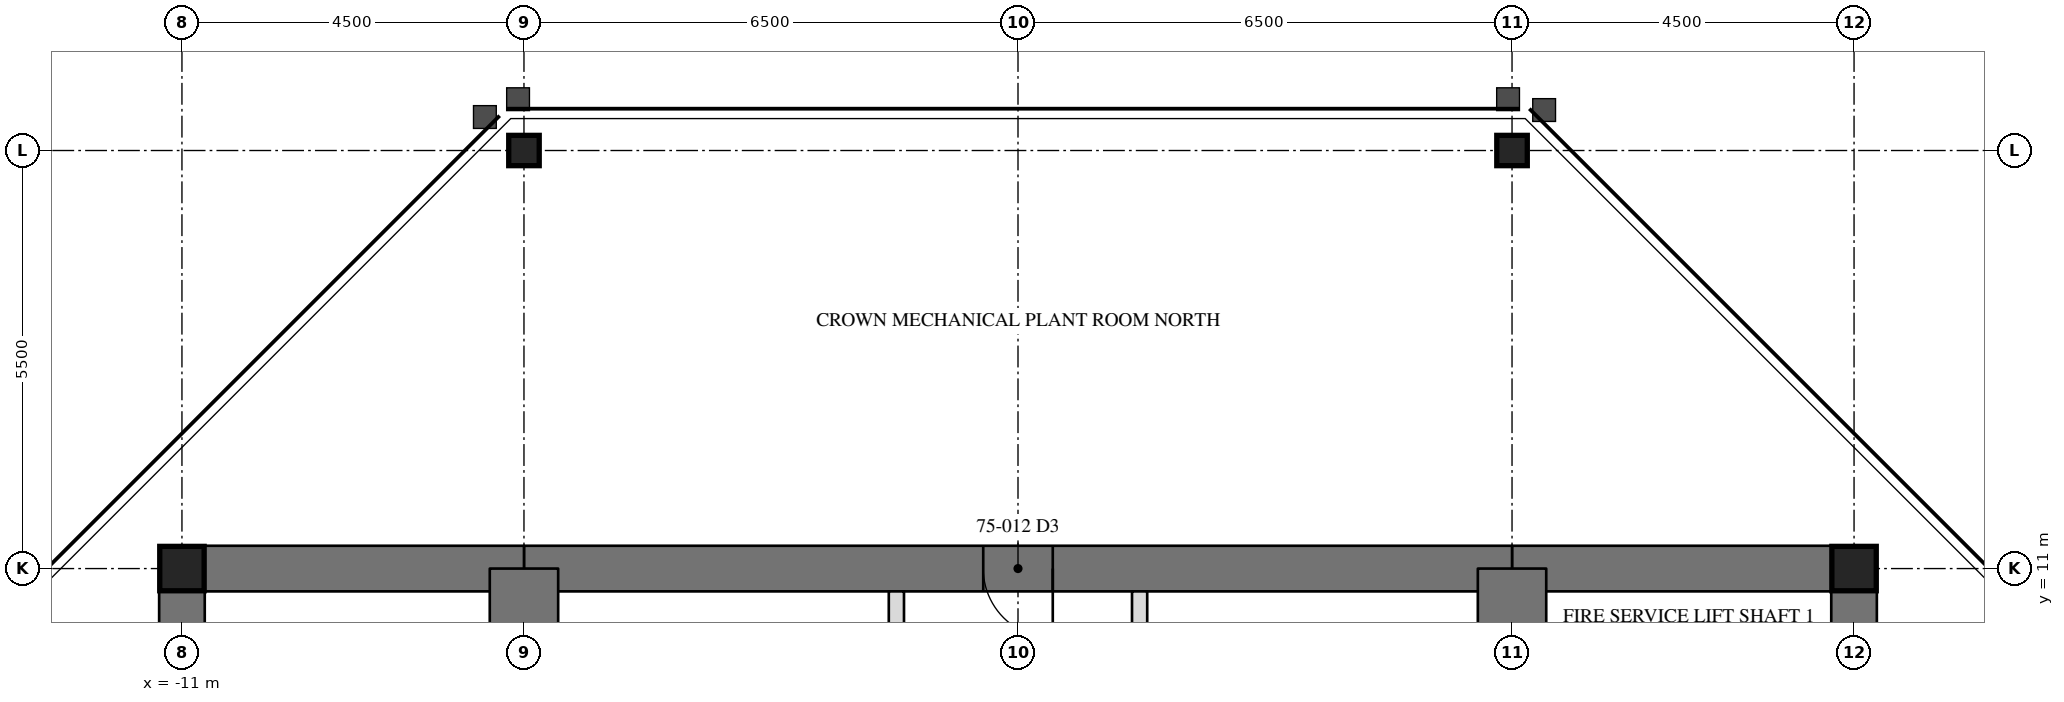
"""IFC4 building model, lengths in metres.
Left out: names, types, materials, properties, quantities, classifications, styles, units other than length and angle.
Written with IfcOpenShell. Run it as: python <this file> out.ifc"""

import sys

from ifc_helpers import new_model, si_unit, direction, frame, frame_2d, origin, origin_2d, place, context, subcontext, project, spatial, rectangle, hollow_rectangle, i_section, extrude, element, fill, save


model = new_model("IFC4")
c1 = context("Model", 3, precision=1e-05, world=origin(), true_north=direction((0.0, 1.0)))
c2 = subcontext(c1, "Body", "Model", "MODEL_VIEW")
j1 = project(units=[si_unit("LENGTHUNIT", "METRE"), si_unit("PLANEANGLEUNIT", "RADIAN")], contexts=[c1])
p1 = place(None, origin())
s1 = spatial("IfcSite", under=j1, at=p1, CompositionType="ELEMENT")
p2 = place(p1, origin())
s2 = spatial("IfcBuilding", under=s1, at=p2, CompositionType="ELEMENT")
p3 = place(p2, frame((0.0, 0.0, 304.2)))
s3 = spatial("IfcBuildingStorey", under=s2, at=p3, CompositionType="ELEMENT", Elevation=304.2)
for number, where, z_axis, x_axis in (
    (1, (6.5, 16.5, 0.0), (0.0, 0.0, 1.0), (1.0, 0.0, 0.0)),
    (2, (-6.5, 16.5, 0.0), (0.0, 0.0, 1.0), (1.0, 0.0, 0.0)),
):
    element("IfcColumn", number, at=place(p3, frame(where, z_axis=z_axis, x_axis=x_axis)), inside=s3, PredefinedType="COLUMN", context=c2, shape_type="SweptSolid", body=[
        extrude(i_section(OverallWidth=0.401, OverallDepth=0.399, WebThickness=0.025, FlangeThickness=0.04, at=origin_2d()), origin(), (0.0, 0.0, 1.0), 6.0),
    ])
p4 = place(p3, frame((11.0, -11.0, 0.0), z_axis=(0.0, 0.0, 1.0), x_axis=(0.0, 1.0, 0.0)))
e3 = element("IfcWall", 3, at=p4, inside=s3, PredefinedType="SHEAR", context=c2, shape_type="SweptSolid", body=[
    extrude(rectangle(XDim=22.0, YDim=0.6, at=frame_2d((11.0, 0.0))), origin(), (0.0, 0.0, 1.0), 6.0),
])
p5 = place(p4, frame((15.393, 0.0, 0.0)))
e4 = element("IfcOpeningElement", 4, at=p5, cuts=e3, PredefinedType="OPENING", context=c2, shape_type="SweptSolid", body=[
    extrude(rectangle(XDim=0.915, YDim=2.134, at=frame_2d((0.458, 1.067))), frame((0.0, 0.31, 0.0), z_axis=(0.0, -1.0, 0.0), x_axis=(1.0, 0.0, 0.0)), (0.0, 0.0, 1.0), 0.62),
])
p6 = place(p3, frame((-11.0, 11.0, 0.0), z_axis=(0.0, 0.0, 1.0), x_axis=(0.0, -1.0, 0.0)))
e5 = element("IfcWall", 5, at=p6, inside=s3, PredefinedType="SHEAR", context=c2, shape_type="SweptSolid", body=[
    extrude(rectangle(XDim=22.0, YDim=0.6, at=frame_2d((11.0, 0.0))), origin(), (0.0, 0.0, 1.0), 6.0),
])
p7 = place(p6, frame((15.393, 0.0, 0.0)))
e6 = element("IfcOpeningElement", 6, at=p7, cuts=e5, PredefinedType="OPENING", context=c2, shape_type="SweptSolid", body=[
    extrude(rectangle(XDim=0.915, YDim=2.134, at=frame_2d((0.458, 1.067))), frame((0.0, 0.31, 0.0), z_axis=(0.0, -1.0, 0.0), x_axis=(1.0, 0.0, 0.0)), (0.0, 0.0, 1.0), 0.62),
])
p8 = place(p3, frame((11.0, 11.0, 0.0), z_axis=(0.0, 0.0, 1.0), x_axis=(-1.0, 0.0, 0.0)))
e7 = element("IfcWall", 7, at=p8, inside=s3, PredefinedType="SHEAR", context=c2, shape_type="SweptSolid", body=[
    extrude(rectangle(XDim=4.5, YDim=0.6, at=frame_2d((2.25, 0.0))), origin(), (0.0, 0.0, 1.0), 6.0),
])
p9 = place(p3, frame((6.5, 11.0, 0.0), z_axis=(0.0, 0.0, 1.0), x_axis=(-1.0, 0.0, 0.0)))
e8 = element("IfcWall", 8, at=p9, inside=s3, PredefinedType="SHEAR", context=c2, shape_type="SweptSolid", body=[
    extrude(rectangle(XDim=13.0, YDim=0.6, at=frame_2d((6.5, 0.0))), origin(), (0.0, 0.0, 1.0), 6.0),
])
p10 = place(p9, frame((6.042, 0.0, 0.0)))
e9 = element("IfcOpeningElement", 9, at=p10, cuts=e8, PredefinedType="OPENING", context=c2, shape_type="SweptSolid", body=[
    extrude(rectangle(XDim=0.915, YDim=2.134, at=frame_2d((0.458, 1.067))), frame((0.0, 0.31, 0.0), z_axis=(0.0, -1.0, 0.0), x_axis=(1.0, 0.0, 0.0)), (0.0, 0.0, 1.0), 0.62),
])
p11 = place(p3, frame((-6.5, 11.0, 0.0), z_axis=(0.0, 0.0, 1.0), x_axis=(-1.0, 0.0, 0.0)))
e10 = element("IfcWall", 10, at=p11, inside=s3, PredefinedType="SHEAR", context=c2, shape_type="SweptSolid", body=[
    extrude(rectangle(XDim=4.5, YDim=0.6, at=frame_2d((2.25, 0.0))), origin(), (0.0, 0.0, 1.0), 6.0),
])
for number, where, z_axis, x_axis in (
    (11, (6.5, 6.5, 0.0), (0.0, 0.0, 1.0), (0.0, 1.0, 0.0)),
    (12, (-6.5, 11.0, 0.0), (0.0, 0.0, 1.0), (0.0, -1.0, 0.0)),
):
    element("IfcWall", number, at=place(p3, frame(where, z_axis=z_axis, x_axis=x_axis)), inside=s3, PredefinedType="SHEAR", context=c2, shape_type="SweptSolid", body=[
        extrude(rectangle(XDim=4.5, YDim=0.9, at=frame_2d((2.25, 0.0))), origin(), (0.0, 0.0, 1.0), 6.0),
    ])
for number, where, z_axis, x_axis in (
    (13, (11.0, 11.0, 0.0), (0.0, 0.0, 1.0), (1.0, 0.0, 0.0)),
    (14, (-11.0, 11.0, 0.0), (0.0, 0.0, 1.0), (1.0, 0.0, 0.0)),
):
    element("IfcColumn", number, at=place(p3, frame(where, z_axis=z_axis, x_axis=x_axis)), inside=s3, PredefinedType="COLUMN", context=c2, shape_type="SweptSolid", body=[
        extrude(hollow_rectangle(XDim=0.584, YDim=0.584, WallThickness=0.051, at=origin_2d()), origin(), (0.0, 0.0, 1.0), 6.0),
    ])
for number, where, z_axis, x_axis in (
    (15, (-1.6, 6.95, 0.0), (0.0, 0.0, 1.0), (0.0, 1.0, 0.0)),
    (16, (1.6, 6.95, 0.0), (0.0, 0.0, 1.0), (0.0, 1.0, 0.0)),
):
    element("IfcWall", number, at=place(p3, frame(where, z_axis=z_axis, x_axis=x_axis)), inside=s3, PredefinedType="PARTITIONING", context=c2, shape_type="SweptSolid", body=[
        extrude(rectangle(XDim=3.75, YDim=0.2, at=frame_2d((1.875, 0.0))), origin(), (0.0, 0.0, 1.0), 5.81),
    ])
p12 = place(p10, origin())
e17 = element("IfcDoor", 17, at=p12, inside=s3, OperationType="SINGLE_SWING_RIGHT", PredefinedType="DOOR", context=c2, shape_type="SweptSolid", body=[
    extrude(rectangle(XDim=0.915, YDim=2.134, at=frame_2d((0.458, 1.067))), frame((0.0, -0.225, 0.0), z_axis=(0.0, -1.0, 0.0), x_axis=(1.0, 0.0, 0.0)), (0.0, 0.0, 1.0), 0.05),
])
fill(e9, e17)
save(model, sys.argv[1])
